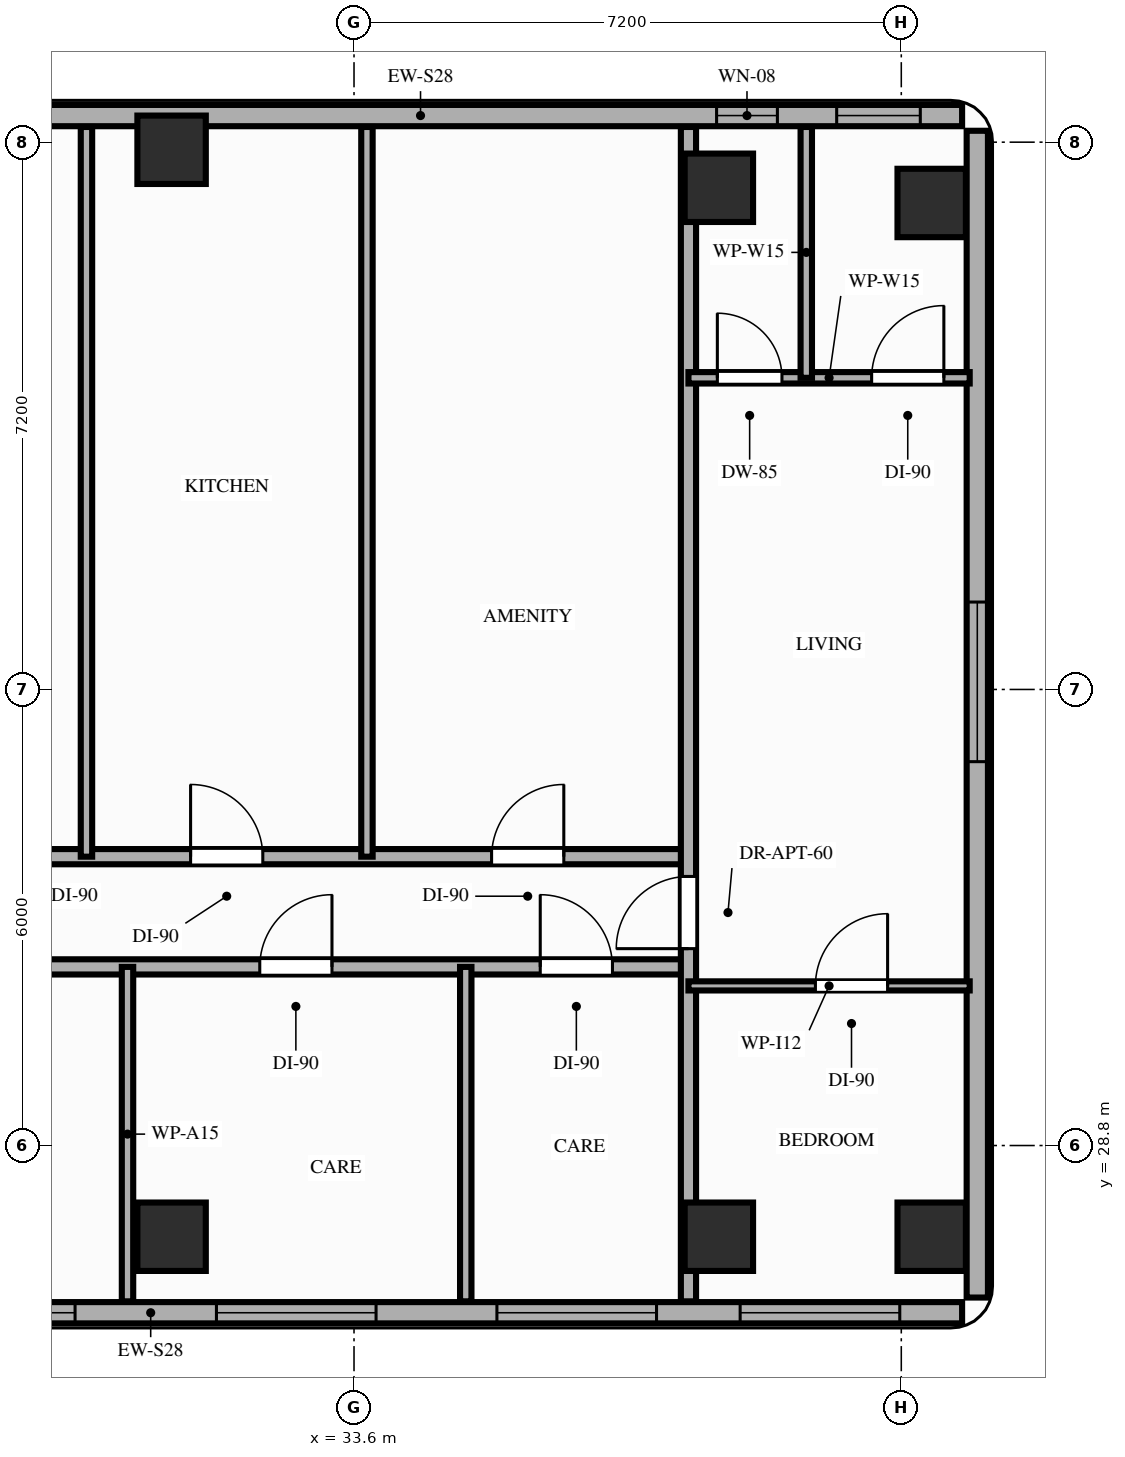
"""IFC4 building model, lengths in metres.
Left out: names, types, materials, properties, quantities, classifications, styles, units other than length and angle.
Written with IfcOpenShell. Run it as: python <this file> out.ifc"""

import sys

from ifc_helpers import new_model, si_unit, direction, frame, frame_2d, origin, origin_2d, place, context, subcontext, project, spatial, rectangle, extrude, element, fill, save


model = new_model("IFC4")
c1 = context("Model", 3, precision=1e-05, world=origin(), true_north=direction((0.0, 1.0)))
c2 = subcontext(c1, "Body", "Model", "MODEL_VIEW")
j1 = project(units=[si_unit("LENGTHUNIT", "METRE"), si_unit("PLANEANGLEUNIT", "RADIAN")], contexts=[c1])
p1 = place(None, origin())
s1 = spatial("IfcSite", under=j1, at=p1, CompositionType="ELEMENT")
p2 = place(p1, origin())
s2 = spatial("IfcBuilding", under=s1, at=p2, CompositionType="ELEMENT")
p3 = place(p2, frame((0.0, 0.0, 192.0)))
s3 = spatial("IfcBuildingStorey", under=s2, at=p3, CompositionType="ELEMENT", Elevation=192.0)
for number, where, z_axis, x_axis in (
    (1, (31.2, 27.6, 0.0), (0.0, 0.0, 1.0), (1.0, 0.0, 0.0)),
    (2, (31.2, 41.9, 0.0), (0.0, 0.0, 1.0), (1.0, 0.0, 0.0)),
    (3, (38.4, 27.6, 0.0), (0.0, 0.0, 1.0), (1.0, 0.0, 0.0)),
    (4, (38.4, 41.4, 0.0), (0.0, 0.0, 1.0), (1.0, 0.0, 0.0)),
    (5, (41.2, 27.6, 0.0), (0.0, 0.0, 1.0), (1.0, 0.0, 0.0)),
    (6, (41.2, 41.2, 0.0), (0.0, 0.0, 1.0), (1.0, 0.0, 0.0)),
):
    element("IfcColumn", number, at=place(p3, frame(where, z_axis=z_axis, x_axis=x_axis)), inside=s3, PredefinedType="COLUMN", context=c2, shape_type="SweptSolid", body=[
        extrude(rectangle(XDim=0.9, YDim=0.9, at=origin_2d()), origin(), (0.0, 0.0, 1.0), 3.2),
    ])
p4 = place(p3, frame((41.6, 42.35, 0.0), z_axis=(0.0, 0.0, 1.0), x_axis=(-1.0, 0.0, 0.0)))
e7 = element("IfcWall", 7, at=p4, inside=s3, PredefinedType="STANDARD", context=c2, shape_type="SweptSolid", body=[
    extrude(rectangle(XDim=14.25, YDim=0.28, at=frame_2d((7.125, 0.0))), origin(), (0.0, 0.0, 1.0), 2.51),
])
p5 = place(p4, frame((2.43, 0.0, 0.85)))
e8 = element("IfcOpeningElement", 8, at=p5, cuts=e7, PredefinedType="OPENING", context=c2, shape_type="SweptSolid", body=[
    extrude(rectangle(XDim=0.8, YDim=1.41, at=frame_2d((0.4, 0.705))), frame((0.0, 0.15, 0.0), z_axis=(0.0, -1.0, 0.0), x_axis=(1.0, 0.0, 0.0)), (0.0, 0.0, 1.0), 0.3),
])
p6 = place(p4, frame((0.55, 0.0, 0.85)))
e9 = element("IfcOpeningElement", 9, at=p6, cuts=e7, PredefinedType="OPENING", context=c2, shape_type="SweptSolid", body=[
    extrude(rectangle(XDim=1.1, YDim=1.41, at=frame_2d((0.55, 0.705))), frame((0.0, 0.15, 0.0), z_axis=(0.0, -1.0, 0.0), x_axis=(1.0, 0.0, 0.0)), (0.0, 0.0, 1.0), 0.3),
])
p7 = place(p3, frame((20.25, 26.6, 0.0), z_axis=(0.0, 0.0, 1.0), x_axis=(1.0, 0.0, 0.0)))
e10 = element("IfcWall", 10, at=p7, inside=s3, PredefinedType="STANDARD", context=c2, shape_type="SweptSolid", body=[
    extrude(rectangle(XDim=21.35, YDim=0.28, at=frame_2d((10.675, 0.0))), origin(), (0.0, 0.0, 1.0), 2.71),
])
p8 = place(p7, frame((2.5, 0.0, 0.85)))
e11 = element("IfcOpeningElement", 11, at=p8, cuts=e10, PredefinedType="OPENING", context=c2, shape_type="SweptSolid", body=[
    extrude(rectangle(XDim=2.1, YDim=1.61, at=frame_2d((1.05, 0.805))), frame((0.0, 0.15, 0.0), z_axis=(0.0, -1.0, 0.0), x_axis=(1.0, 0.0, 0.0)), (0.0, 0.0, 1.0), 0.3),
])
p9 = place(p7, frame((18.43, 0.0, 0.85)))
e12 = element("IfcOpeningElement", 12, at=p9, cuts=e10, PredefinedType="OPENING", context=c2, shape_type="SweptSolid", body=[
    extrude(rectangle(XDim=2.1, YDim=1.61, at=frame_2d((1.05, 0.805))), frame((0.0, 0.15, 0.0), z_axis=(0.0, -1.0, 0.0), x_axis=(1.0, 0.0, 0.0)), (0.0, 0.0, 1.0), 0.3),
])
p10 = place(p7, frame((7.58, 0.0, 0.85)))
e13 = element("IfcOpeningElement", 13, at=p10, cuts=e10, PredefinedType="OPENING", context=c2, shape_type="SweptSolid", body=[
    extrude(rectangle(XDim=2.1, YDim=1.61, at=frame_2d((1.05, 0.805))), frame((0.0, 0.15, 0.0), z_axis=(0.0, -1.0, 0.0), x_axis=(1.0, 0.0, 0.0)), (0.0, 0.0, 1.0), 0.3),
])
p11 = place(p7, frame((11.54, 0.0, 0.85)))
e14 = element("IfcOpeningElement", 14, at=p11, cuts=e10, PredefinedType="OPENING", context=c2, shape_type="SweptSolid", body=[
    extrude(rectangle(XDim=2.1, YDim=1.61, at=frame_2d((1.05, 0.805))), frame((0.0, 0.15, 0.0), z_axis=(0.0, -1.0, 0.0), x_axis=(1.0, 0.0, 0.0)), (0.0, 0.0, 1.0), 0.3),
])
p12 = place(p7, frame((15.23, 0.0, 0.85)))
e15 = element("IfcOpeningElement", 15, at=p12, cuts=e10, PredefinedType="OPENING", context=c2, shape_type="SweptSolid", body=[
    extrude(rectangle(XDim=2.1, YDim=1.61, at=frame_2d((1.05, 0.805))), frame((0.0, 0.15, 0.0), z_axis=(0.0, -1.0, 0.0), x_axis=(1.0, 0.0, 0.0)), (0.0, 0.0, 1.0), 0.3),
])
p13 = place(p3, frame((41.8, 26.8, 0.0), z_axis=(0.0, 0.0, 1.0), x_axis=(0.0, 1.0, 0.0)))
e16 = element("IfcWall", 16, at=p13, inside=s3, PredefinedType="STANDARD", context=c2, shape_type="SweptSolid", body=[
    extrude(rectangle(XDim=15.35, YDim=0.28, at=frame_2d((7.675, 0.0))), origin(), (0.0, 0.0, 1.0), 3.02),
])
p14 = place(p13, frame((7.05, 0.0, 0.85)))
e17 = element("IfcOpeningElement", 17, at=p14, cuts=e16, PredefinedType="OPENING", context=c2, shape_type="SweptSolid", body=[
    extrude(rectangle(XDim=2.1, YDim=1.8, at=frame_2d((1.05, 0.9))), frame((0.0, 0.15, 0.0), z_axis=(0.0, -1.0, 0.0), x_axis=(1.0, 0.0, 0.0)), (0.0, 0.0, 1.0), 0.3),
])
p15 = place(p3, frame((27.15, 31.15, 0.0), z_axis=(0.0, 0.0, 1.0), x_axis=(1.0, 0.0, 0.0)))
e18 = element("IfcWall", 18, at=p15, inside=s3, PredefinedType="PARTITIONING", context=c2, shape_type="SweptSolid", body=[
    extrude(rectangle(XDim=10.85, YDim=0.2, at=frame_2d((5.425, 0.0))), origin(), (0.0, 0.0, 1.0), 2.51),
])
p16 = place(p15, frame((1.25, 0.0, 0.0)))
e19 = element("IfcOpeningElement", 19, at=p16, cuts=e18, PredefinedType="OPENING", context=c2, shape_type="SweptSolid", body=[
    extrude(rectangle(XDim=0.95, YDim=2.15, at=frame_2d((0.475, 1.075))), frame((0.0, 0.11, 0.0), z_axis=(0.0, -1.0, 0.0), x_axis=(1.0, 0.0, 0.0)), (0.0, 0.0, 1.0), 0.22),
])
p17 = place(p15, frame((5.21, 0.0, 0.0)))
e20 = element("IfcOpeningElement", 20, at=p17, cuts=e18, PredefinedType="OPENING", context=c2, shape_type="SweptSolid", body=[
    extrude(rectangle(XDim=0.95, YDim=2.15, at=frame_2d((0.475, 1.075))), frame((0.0, 0.11, 0.0), z_axis=(0.0, -1.0, 0.0), x_axis=(1.0, 0.0, 0.0)), (0.0, 0.0, 1.0), 0.22),
])
p18 = place(p15, frame((8.9, 0.0, 0.0)))
e21 = element("IfcOpeningElement", 21, at=p18, cuts=e18, PredefinedType="OPENING", context=c2, shape_type="SweptSolid", body=[
    extrude(rectangle(XDim=0.95, YDim=2.15, at=frame_2d((0.475, 1.075))), frame((0.0, 0.11, 0.0), z_axis=(0.0, -1.0, 0.0), x_axis=(1.0, 0.0, 0.0)), (0.0, 0.0, 1.0), 0.22),
])
p19 = place(p3, frame((27.15, 32.6, 0.0), z_axis=(0.0, 0.0, 1.0), x_axis=(1.0, 0.0, 0.0)))
e22 = element("IfcWall", 22, at=p19, inside=s3, PredefinedType="PARTITIONING", context=c2, shape_type="SweptSolid", body=[
    extrude(rectangle(XDim=10.85, YDim=0.2, at=frame_2d((5.425, 0.0))), origin(), (0.0, 0.0, 1.0), 2.51),
])
p20 = place(p19, frame((1.22, 0.0, 0.0)))
e23 = element("IfcOpeningElement", 23, at=p20, cuts=e22, PredefinedType="OPENING", context=c2, shape_type="SweptSolid", body=[
    extrude(rectangle(XDim=0.95, YDim=2.15, at=frame_2d((0.475, 1.075))), frame((0.0, 0.11, 0.0), z_axis=(0.0, -1.0, 0.0), x_axis=(1.0, 0.0, 0.0)), (0.0, 0.0, 1.0), 0.22),
])
p21 = place(p19, frame((4.3, 0.0, 0.0)))
e24 = element("IfcOpeningElement", 24, at=p21, cuts=e22, PredefinedType="OPENING", context=c2, shape_type="SweptSolid", body=[
    extrude(rectangle(XDim=0.95, YDim=2.15, at=frame_2d((0.475, 1.075))), frame((0.0, 0.11, 0.0), z_axis=(0.0, -1.0, 0.0), x_axis=(1.0, 0.0, 0.0)), (0.0, 0.0, 1.0), 0.22),
])
p22 = place(p19, frame((8.26, 0.0, 0.0)))
e25 = element("IfcOpeningElement", 25, at=p22, cuts=e22, PredefinedType="OPENING", context=c2, shape_type="SweptSolid", body=[
    extrude(rectangle(XDim=0.95, YDim=2.15, at=frame_2d((0.475, 1.075))), frame((0.0, 0.11, 0.0), z_axis=(0.0, -1.0, 0.0), x_axis=(1.0, 0.0, 0.0)), (0.0, 0.0, 1.0), 0.22),
])
p23 = place(p3, frame((38.0, 26.75, 0.0), z_axis=(0.0, 0.0, 1.0), x_axis=(0.0, 1.0, 0.0)))
e26 = element("IfcWall", 26, at=p23, inside=s3, PredefinedType="PARTITIONING", context=c2, shape_type="SweptSolid", body=[
    extrude(rectangle(XDim=15.45, YDim=0.2, at=frame_2d((7.725, 0.0))), origin(), (0.0, 0.0, 1.0), 2.51),
])
p24 = place(p23, frame((4.64, 0.0, 0.0)))
e27 = element("IfcOpeningElement", 27, at=p24, cuts=e26, PredefinedType="OPENING", context=c2, shape_type="SweptSolid", body=[
    extrude(rectangle(XDim=0.95, YDim=2.15, at=frame_2d((0.475, 1.075))), frame((0.0, 0.11, 0.0), z_axis=(0.0, -1.0, 0.0), x_axis=(1.0, 0.0, 0.0)), (0.0, 0.0, 1.0), 0.22),
])
p25 = place(p3, frame((38.0, 30.9, 0.0), z_axis=(0.0, 0.0, 1.0), x_axis=(1.0, 0.0, 0.0)))
e28 = element("IfcWall", 28, at=p25, inside=s3, PredefinedType="PARTITIONING", context=c2, shape_type="SweptSolid", body=[
    extrude(rectangle(XDim=3.7, YDim=0.12, at=frame_2d((1.85, 0.0))), origin(), (0.0, 0.0, 1.0), 2.51),
])
p26 = place(p25, frame((1.67, 0.0, 0.0)))
e29 = element("IfcOpeningElement", 29, at=p26, cuts=e28, PredefinedType="OPENING", context=c2, shape_type="SweptSolid", body=[
    extrude(rectangle(XDim=0.95, YDim=2.15, at=frame_2d((0.475, 1.075))), frame((0.0, 0.07, 0.0), z_axis=(0.0, -1.0, 0.0), x_axis=(1.0, 0.0, 0.0)), (0.0, 0.0, 1.0), 0.14),
])
p27 = place(p3, frame((38.0, 38.9, 0.0), z_axis=(0.0, 0.0, 1.0), x_axis=(1.0, 0.0, 0.0)))
e30 = element("IfcWall", 30, at=p27, inside=s3, PredefinedType="PARTITIONING", context=c2, shape_type="SweptSolid", body=[
    extrude(rectangle(XDim=3.7, YDim=0.15, at=frame_2d((1.85, 0.0))), origin(), (0.0, 0.0, 1.0), 2.51),
])
p28 = place(p27, frame((0.38, 0.0, 0.0)))
e31 = element("IfcOpeningElement", 31, at=p28, cuts=e30, PredefinedType="OPENING", context=c2, shape_type="SweptSolid", body=[
    extrude(rectangle(XDim=0.85, YDim=2.1, at=frame_2d((0.425, 1.05))), frame((0.0, 0.085, 0.0), z_axis=(0.0, -1.0, 0.0), x_axis=(1.0, 0.0, 0.0)), (0.0, 0.0, 1.0), 0.17),
])
p29 = place(p27, frame((2.41, 0.0, 0.0)))
e32 = element("IfcOpeningElement", 32, at=p29, cuts=e30, PredefinedType="OPENING", context=c2, shape_type="SweptSolid", body=[
    extrude(rectangle(XDim=0.95, YDim=2.15, at=frame_2d((0.475, 1.075))), frame((0.0, 0.085, 0.0), z_axis=(0.0, -1.0, 0.0), x_axis=(1.0, 0.0, 0.0)), (0.0, 0.0, 1.0), 0.17),
])
p30 = place(p3, frame((39.55, 38.9, 0.0), z_axis=(0.0, 0.0, 1.0), x_axis=(0.0, 1.0, 0.0)))
e33 = element("IfcWall", 33, at=p30, inside=s3, PredefinedType="PARTITIONING", context=c2, shape_type="SweptSolid", body=[
    extrude(rectangle(XDim=3.3, YDim=0.15, at=frame_2d((1.65, 0.0))), origin(), (0.0, 0.0, 1.0), 2.51),
])
for number, where, z_axis, x_axis in (
    (34, (30.62, 26.75, 0.0), (0.0, 0.0, 1.0), (0.0, 1.0, 0.0)),
    (35, (35.07, 26.75, 0.0), (0.0, 0.0, 1.0), (0.0, 1.0, 0.0)),
):
    element("IfcWall", number, at=place(p3, frame(where, z_axis=z_axis, x_axis=x_axis)), inside=s3, PredefinedType="PARTITIONING", context=c2, shape_type="SweptSolid", body=[
        extrude(rectangle(XDim=4.4, YDim=0.15, at=frame_2d((2.2, 0.0))), origin(), (0.0, 0.0, 1.0), 2.51),
    ])
for number, where, z_axis, x_axis in (
    (36, (30.08, 32.6, 0.0), (0.0, 0.0, 1.0), (0.0, 1.0, 0.0)),
    (37, (33.77, 32.6, 0.0), (0.0, 0.0, 1.0), (0.0, 1.0, 0.0)),
):
    element("IfcWall", number, at=place(p3, frame(where, z_axis=z_axis, x_axis=x_axis)), inside=s3, PredefinedType="PARTITIONING", context=c2, shape_type="SweptSolid", body=[
        extrude(rectangle(XDim=9.6, YDim=0.15, at=frame_2d((4.8, 0.0))), origin(), (0.0, 0.0, 1.0), 2.51),
    ])
p31 = place(p14, origin())
e38 = element("IfcWindow", 38, at=p31, inside=s3, PartitioningType="SINGLE_PANEL", PredefinedType="WINDOW", context=c2, shape_type="SweptSolid", body=[
    extrude(rectangle(XDim=2.1, YDim=1.8, at=frame_2d((1.05, 0.9))), frame((0.0, 0.03, 0.0), z_axis=(0.0, -1.0, 0.0), x_axis=(1.0, 0.0, 0.0)), (0.0, 0.0, 1.0), 0.06),
])
fill(e17, e38)
p32 = place(p9, origin())
e39 = element("IfcWindow", 39, at=p32, inside=s3, PartitioningType="SINGLE_PANEL", PredefinedType="WINDOW", context=c2, shape_type="SweptSolid", body=[
    extrude(rectangle(XDim=2.1, YDim=1.61, at=frame_2d((1.05, 0.805))), frame((0.0, 0.03, 0.0), z_axis=(0.0, -1.0, 0.0), x_axis=(1.0, 0.0, 0.0)), (0.0, 0.0, 1.0), 0.06),
])
fill(e12, e39)
p33 = place(p5, origin())
e40 = element("IfcWindow", 40, at=p33, inside=s3, PartitioningType="SINGLE_PANEL", PredefinedType="WINDOW", context=c2, shape_type="SweptSolid", body=[
    extrude(rectangle(XDim=0.8, YDim=1.41, at=frame_2d((0.4, 0.705))), frame((0.0, 0.03, 0.0), z_axis=(0.0, -1.0, 0.0), x_axis=(1.0, 0.0, 0.0)), (0.0, 0.0, 1.0), 0.06),
])
fill(e8, e40)
p34 = place(p6, origin())
e41 = element("IfcWindow", 41, at=p34, inside=s3, PartitioningType="SINGLE_PANEL", PredefinedType="WINDOW", context=c2, shape_type="SweptSolid", body=[
    extrude(rectangle(XDim=1.1, YDim=1.41, at=frame_2d((0.55, 0.705))), frame((0.0, 0.03, 0.0), z_axis=(0.0, -1.0, 0.0), x_axis=(1.0, 0.0, 0.0)), (0.0, 0.0, 1.0), 0.06),
])
fill(e9, e41)
p35 = place(p10, origin())
e42 = element("IfcWindow", 42, at=p35, inside=s3, PartitioningType="SINGLE_PANEL", PredefinedType="WINDOW", context=c2, shape_type="SweptSolid", body=[
    extrude(rectangle(XDim=2.1, YDim=1.61, at=frame_2d((1.05, 0.805))), frame((0.0, 0.03, 0.0), z_axis=(0.0, -1.0, 0.0), x_axis=(1.0, 0.0, 0.0)), (0.0, 0.0, 1.0), 0.06),
])
fill(e13, e42)
p36 = place(p11, origin())
e43 = element("IfcWindow", 43, at=p36, inside=s3, PartitioningType="SINGLE_PANEL", PredefinedType="WINDOW", context=c2, shape_type="SweptSolid", body=[
    extrude(rectangle(XDim=2.1, YDim=1.61, at=frame_2d((1.05, 0.805))), frame((0.0, 0.03, 0.0), z_axis=(0.0, -1.0, 0.0), x_axis=(1.0, 0.0, 0.0)), (0.0, 0.0, 1.0), 0.06),
])
fill(e14, e43)
p37 = place(p12, origin())
e44 = element("IfcWindow", 44, at=p37, inside=s3, PartitioningType="SINGLE_PANEL", PredefinedType="WINDOW", context=c2, shape_type="SweptSolid", body=[
    extrude(rectangle(XDim=2.1, YDim=1.61, at=frame_2d((1.05, 0.805))), frame((0.0, 0.03, 0.0), z_axis=(0.0, -1.0, 0.0), x_axis=(1.0, 0.0, 0.0)), (0.0, 0.0, 1.0), 0.06),
])
fill(e15, e44)
p38 = place(p24, origin())
e45 = element("IfcDoor", 45, at=p38, inside=s3, OperationType="SINGLE_SWING_LEFT", PredefinedType="DOOR", context=c2, shape_type="SweptSolid", body=[
    extrude(rectangle(XDim=0.95, YDim=2.15, at=frame_2d((0.475, 1.075))), frame((0.0, 0.025, 0.0), z_axis=(0.0, -1.0, 0.0), x_axis=(1.0, 0.0, 0.0)), (0.0, 0.0, 1.0), 0.05),
])
fill(e27, e45)
p39 = place(p26, origin())
e46 = element("IfcDoor", 46, at=p39, inside=s3, OperationType="SINGLE_SWING_RIGHT", PredefinedType="DOOR", context=c2, shape_type="SweptSolid", body=[
    extrude(rectangle(XDim=0.95, YDim=2.15, at=frame_2d((0.475, 1.075))), frame((0.0, 0.025, 0.0), z_axis=(0.0, -1.0, 0.0), x_axis=(1.0, 0.0, 0.0)), (0.0, 0.0, 1.0), 0.05),
])
fill(e29, e46)
p40 = place(p28, origin())
e47 = element("IfcDoor", 47, at=p40, inside=s3, OperationType="SINGLE_SWING_LEFT", PredefinedType="DOOR", context=c2, shape_type="SweptSolid", body=[
    extrude(rectangle(XDim=0.85, YDim=2.1, at=frame_2d((0.425, 1.05))), frame((0.0, 0.025, 0.0), z_axis=(0.0, -1.0, 0.0), x_axis=(1.0, 0.0, 0.0)), (0.0, 0.0, 1.0), 0.05),
])
fill(e31, e47)
p41 = place(p29, origin())
e48 = element("IfcDoor", 48, at=p41, inside=s3, OperationType="SINGLE_SWING_RIGHT", PredefinedType="DOOR", context=c2, shape_type="SweptSolid", body=[
    extrude(rectangle(XDim=0.95, YDim=2.15, at=frame_2d((0.475, 1.075))), frame((0.0, 0.025, 0.0), z_axis=(0.0, -1.0, 0.0), x_axis=(1.0, 0.0, 0.0)), (0.0, 0.0, 1.0), 0.05),
])
fill(e32, e48)
p42 = place(p17, origin())
e49 = element("IfcDoor", 49, at=p42, inside=s3, OperationType="SINGLE_SWING_RIGHT", PredefinedType="DOOR", context=c2, shape_type="SweptSolid", body=[
    extrude(rectangle(XDim=0.95, YDim=2.15, at=frame_2d((0.475, 1.075))), frame((0.0, 0.025, 0.0), z_axis=(0.0, -1.0, 0.0), x_axis=(1.0, 0.0, 0.0)), (0.0, 0.0, 1.0), 0.05),
])
fill(e20, e49)
p43 = place(p18, origin())
e50 = element("IfcDoor", 50, at=p43, inside=s3, OperationType="SINGLE_SWING_LEFT", PredefinedType="DOOR", context=c2, shape_type="SweptSolid", body=[
    extrude(rectangle(XDim=0.95, YDim=2.15, at=frame_2d((0.475, 1.075))), frame((0.0, 0.025, 0.0), z_axis=(0.0, -1.0, 0.0), x_axis=(1.0, 0.0, 0.0)), (0.0, 0.0, 1.0), 0.05),
])
fill(e21, e50)
p44 = place(p21, origin())
e51 = element("IfcDoor", 51, at=p44, inside=s3, OperationType="SINGLE_SWING_LEFT", PredefinedType="DOOR", context=c2, shape_type="SweptSolid", body=[
    extrude(rectangle(XDim=0.95, YDim=2.15, at=frame_2d((0.475, 1.075))), frame((0.0, 0.025, 0.0), z_axis=(0.0, -1.0, 0.0), x_axis=(1.0, 0.0, 0.0)), (0.0, 0.0, 1.0), 0.05),
])
fill(e24, e51)
p45 = place(p22, origin())
e52 = element("IfcDoor", 52, at=p45, inside=s3, OperationType="SINGLE_SWING_RIGHT", PredefinedType="DOOR", context=c2, shape_type="SweptSolid", body=[
    extrude(rectangle(XDim=0.95, YDim=2.15, at=frame_2d((0.475, 1.075))), frame((0.0, 0.025, 0.0), z_axis=(0.0, -1.0, 0.0), x_axis=(1.0, 0.0, 0.0)), (0.0, 0.0, 1.0), 0.05),
])
fill(e25, e52)
save(model, sys.argv[1])
